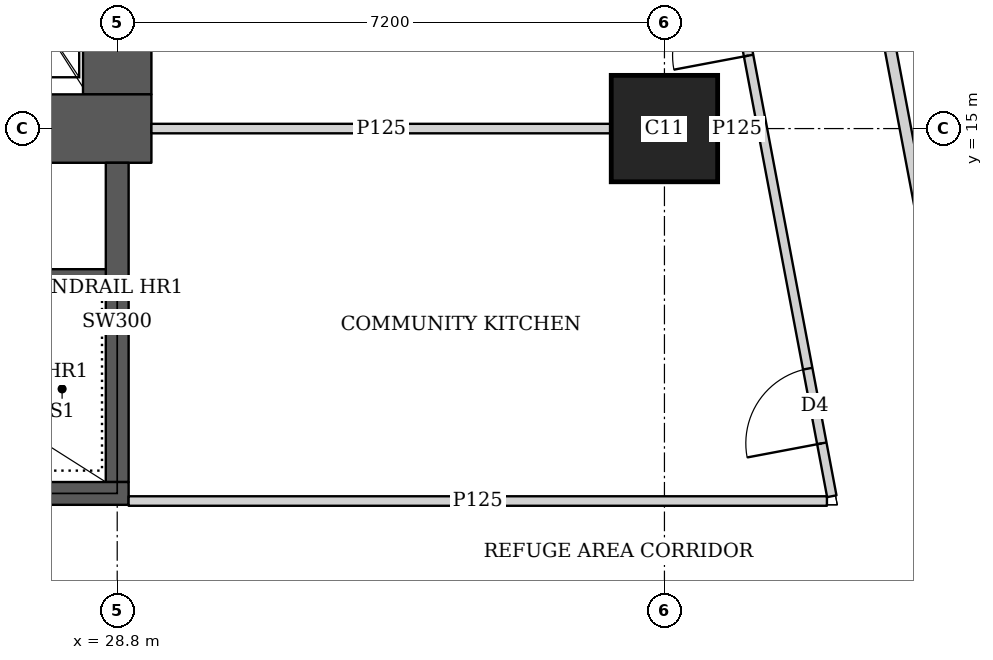
"""IFC4 building model, lengths in metres.
Left out: names, types, materials, properties, quantities, classifications, styles, units other than length and angle.
Written with IfcOpenShell. Run it as: python <this file> out.ifc"""

import sys

from ifc_helpers import new_model, si_unit, direction, frame, frame_2d, origin, origin_2d, place, context, subcontext, project, spatial, rectangle, extrude, element, fill, save


model = new_model("IFC4")
c1 = context("Model", 3, precision=1e-05, world=origin(), true_north=direction((0.0, 1.0)))
c2 = subcontext(c1, "Body", "Model", "MODEL_VIEW")
j1 = project(units=[si_unit("LENGTHUNIT", "METRE"), si_unit("PLANEANGLEUNIT", "RADIAN")], contexts=[c1])
p1 = place(None, origin())
s1 = spatial("IfcSite", under=j1, at=p1, CompositionType="ELEMENT")
p2 = place(p1, origin())
s2 = spatial("IfcBuilding", under=s1, at=p2, CompositionType="ELEMENT")
p3 = place(p2, frame((0.0, 0.0, 246.2)))
s3 = spatial("IfcBuildingStorey", under=s2, at=p3, CompositionType="ELEMENT", Elevation=246.2)
p4 = place(p3, frame((36.0, 15.0, 0.0), z_axis=(0.0, 0.0, 1.0), x_axis=(1.0, 0.0, 0.0)))
e1 = element("IfcColumn", 1, at=p4, inside=s3, PredefinedType="COLUMN", context=c2, shape_type="SweptSolid", body=[
    extrude(rectangle(XDim=1.4, YDim=1.4, at=origin_2d()), origin(), (0.0, 0.0, 1.0), 5.4),
])
p5 = place(p3, frame((13.95, 15.0, 0.0), z_axis=(0.0, 0.0, 1.0), x_axis=(1.0, 0.0, 0.0)))
e2 = element("IfcWall", 2, at=p5, inside=s3, PredefinedType="SHEAR", context=c2, shape_type="SweptSolid", body=[
    extrude(rectangle(XDim=15.3, YDim=0.9, at=frame_2d((7.65, 0.0))), origin(), (0.0, 0.0, 1.0), 5.4),
])
p6 = place(p5, frame((4.45, 0.0, 0.0)))
e3 = element("IfcOpeningElement", 3, at=p6, cuts=e2, PredefinedType="OPENING", context=c2, shape_type="SweptSolid", body=[
    extrude(rectangle(XDim=1.8, YDim=2.1, at=frame_2d((0.9, 1.05))), frame((0.0, 0.46, 0.0), z_axis=(0.0, -1.0, 0.0), x_axis=(1.0, 0.0, 0.0)), (0.0, 0.0, 1.0), 0.92),
])
p7 = place(p5, frame((10.7, 0.0, 0.0)))
e4 = element("IfcOpeningElement", 4, at=p7, cuts=e2, PredefinedType="OPENING", context=c2, shape_type="SweptSolid", body=[
    extrude(rectangle(XDim=1.1, YDim=2.1, at=frame_2d((0.55, 1.05))), frame((0.0, 0.46, 0.0), z_axis=(0.0, -1.0, 0.0), x_axis=(1.0, 0.0, 0.0)), (0.0, 0.0, 1.0), 0.92),
])
p8 = place(p3, frame((28.8, 15.45, 0.0), z_axis=(0.0, 0.0, 1.0), x_axis=(0.0, 1.0, 0.0)))
e5 = element("IfcWall", 5, at=p8, inside=s3, PredefinedType="SHEAR", context=c2, shape_type="SweptSolid", body=[
    extrude(rectangle(XDim=14.1, YDim=0.9, at=frame_2d((7.05, 0.0))), origin(), (0.0, 0.0, 1.0), 5.4),
])
p9 = place(p3, frame((21.45, 10.2, 0.0), z_axis=(0.0, 0.0, 1.0), x_axis=(1.0, 0.0, 0.0)))
e6 = element("IfcWall", 6, at=p9, inside=s3, PredefinedType="SHEAR", context=c2, shape_type="SweptSolid", body=[
    extrude(rectangle(XDim=7.5, YDim=0.3, at=frame_2d((3.75, 0.0))), origin(), (0.0, 0.0, 1.0), 5.4),
])
p10 = place(p9, frame((0.5, 0.0, 0.0)))
e7 = element("IfcOpeningElement", 7, at=p10, cuts=e6, PredefinedType="OPENING", context=c2, shape_type="SweptSolid", body=[
    extrude(rectangle(XDim=1.1, YDim=2.1, at=frame_2d((0.55, 1.05))), frame((0.0, 0.16, 0.0), z_axis=(0.0, -1.0, 0.0), x_axis=(1.0, 0.0, 0.0)), (0.0, 0.0, 1.0), 0.32),
])
p11 = place(p3, frame((28.8, 10.35, 0.0), z_axis=(0.0, 0.0, 1.0), x_axis=(0.0, 1.0, 0.0)))
e8 = element("IfcWall", 8, at=p11, inside=s3, PredefinedType="SHEAR", context=c2, shape_type="SweptSolid", body=[
    extrude(rectangle(XDim=4.2, YDim=0.3, at=frame_2d((2.1, 0.0))), origin(), (0.0, 0.0, 1.0), 5.4),
])
p12 = place(p3, frame((33.382, 45.65, 0.0), z_axis=(0.0, 0.0, 1.0), x_axis=(0.185582712124, -0.982628646519, 0.0)))
e9 = element("IfcWall", 9, at=p12, inside=s3, PredefinedType="SOLIDWALL", context=c2, shape_type="SweptSolid", body=[
    extrude(rectangle(XDim=46.044, YDim=0.15, at=frame_2d((23.022, 0.0))), origin(), (0.0, 0.0, 1.0), 3.35),
])
p13 = place(p12, frame((24.35, 0.0, 0.0)))
e10 = element("IfcOpeningElement", 10, at=p13, cuts=e9, PredefinedType="OPENING", context=c2, shape_type="SweptSolid", body=[
    extrude(rectangle(XDim=1.0, YDim=2.1, at=frame_2d((0.5, 1.05))), frame((0.0, 0.085, 0.0), z_axis=(0.0, -1.0, 0.0), x_axis=(1.0, 0.0, 0.0)), (0.0, 0.0, 1.0), 0.17),
])
p14 = place(p3, frame((28.95, 10.1, 0.0), z_axis=(0.0, 0.0, 1.0), x_axis=(1.0, 0.0, 0.0)))
e11 = element("IfcWall", 11, at=p14, inside=s3, PredefinedType="PARTITIONING", context=c2, shape_type="SweptSolid", body=[
    extrude(rectangle(XDim=9.188, YDim=0.125, at=frame_2d((4.594, 0.0))), origin(), (0.0, 0.0, 1.0), 2.75),
])
p15 = place(p3, frame((38.202, 10.163, 0.0), z_axis=(0.0, 0.0, 1.0), x_axis=(-0.185610321132, 0.982623431783, 0.0)))
e12 = element("IfcWall", 12, at=p15, inside=s3, PredefinedType="PARTITIONING", context=c2, shape_type="SweptSolid", body=[
    extrude(rectangle(XDim=25.111, YDim=0.125, at=frame_2d((12.556, 0.0))), origin(), (0.0, 0.0, 1.0), 3.55),
])
p16 = place(p15, frame((0.708, 0.0, 0.0)))
e13 = element("IfcOpeningElement", 13, at=p16, cuts=e12, PredefinedType="OPENING", context=c2, shape_type="SweptSolid", body=[
    extrude(rectangle(XDim=1.0, YDim=2.1, at=frame_2d((0.5, 1.05))), frame((0.0, 0.073, 0.0), z_axis=(0.0, -1.0, 0.0), x_axis=(1.0, 0.0, 0.0)), (0.0, 0.0, 1.0), 0.145),
])
p17 = place(p15, frame((5.9, 0.0, 0.0)))
e14 = element("IfcOpeningElement", 14, at=p17, cuts=e12, PredefinedType="OPENING", context=c2, shape_type="SweptSolid", body=[
    extrude(rectangle(XDim=1.0, YDim=2.1, at=frame_2d((0.5, 1.05))), frame((0.0, 0.073, 0.0), z_axis=(0.0, -1.0, 0.0), x_axis=(1.0, 0.0, 0.0)), (0.0, 0.0, 1.0), 0.145),
])
p18 = place(p15, frame((21.15, 0.0, 0.0)))
e15 = element("IfcOpeningElement", 15, at=p18, cuts=e12, PredefinedType="OPENING", context=c2, shape_type="SweptSolid", body=[
    extrude(rectangle(XDim=1.0, YDim=2.1, at=frame_2d((0.5, 1.05))), frame((0.0, 0.073, 0.0), z_axis=(0.0, -1.0, 0.0), x_axis=(1.0, 0.0, 0.0)), (0.0, 0.0, 1.0), 0.145),
])
p19 = place(p15, frame((13.378, 0.0, 0.0)))
e16 = element("IfcOpeningElement", 16, at=p19, cuts=e12, PredefinedType="OPENING", context=c2, shape_type="SweptSolid", body=[
    extrude(rectangle(XDim=1.0, YDim=2.1, at=frame_2d((0.5, 1.05))), frame((0.0, 0.073, 0.0), z_axis=(0.0, -1.0, 0.0), x_axis=(1.0, 0.0, 0.0)), (0.0, 0.0, 1.0), 0.145),
])
p20 = place(p15, frame((15.973, 0.0, 0.0)))
e17 = element("IfcOpeningElement", 17, at=p20, cuts=e12, PredefinedType="OPENING", context=c2, shape_type="SweptSolid", body=[
    extrude(rectangle(XDim=1.0, YDim=2.1, at=frame_2d((0.5, 1.05))), frame((0.0, 0.073, 0.0), z_axis=(0.0, -1.0, 0.0), x_axis=(1.0, 0.0, 0.0)), (0.0, 0.0, 1.0), 0.145),
])
p21 = place(p15, frame((18.467, 0.0, 0.0)))
e18 = element("IfcOpeningElement", 18, at=p21, cuts=e12, PredefinedType="OPENING", context=c2, shape_type="SweptSolid", body=[
    extrude(rectangle(XDim=1.0, YDim=2.1, at=frame_2d((0.5, 1.05))), frame((0.0, 0.073, 0.0), z_axis=(0.0, -1.0, 0.0), x_axis=(1.0, 0.0, 0.0)), (0.0, 0.0, 1.0), 0.145),
])
p22 = place(p3, frame((29.25, 15.0, 0.0), z_axis=(0.0, 0.0, 1.0), x_axis=(1.0, 0.0, 0.0)))
e19 = element("IfcWall", 19, at=p22, inside=s3, PredefinedType="PARTITIONING", context=c2, shape_type="SweptSolid", body=[
    extrude(rectangle(XDim=6.049, YDim=0.125, at=frame_2d((3.024, 0.0))), origin(), (0.0, 0.0, 1.0), 3.55),
])
p23 = place(p3, frame((36.701, 15.0, 0.0), z_axis=(0.0, 0.0, 1.0), x_axis=(1.0, 0.0, 0.0)))
e20 = element("IfcWall", 20, at=p23, inside=s3, PredefinedType="PARTITIONING", context=c2, shape_type="SweptSolid", body=[
    extrude(rectangle(XDim=0.512, YDim=0.125, at=frame_2d((0.256, 0.0))), origin(), (0.0, 0.0, 1.0), 3.55),
])
p24 = place(p3, frame((23.0, 13.05, 0.0), z_axis=(0.0, 0.0, 1.0), x_axis=(1.0, 0.0, 0.0)))
e21 = element("IfcWall", 21, at=p24, inside=s3, PredefinedType="SHEAR", context=c2, shape_type="SweptSolid", body=[
    extrude(rectangle(XDim=5.8, YDim=0.2, at=frame_2d((2.9, 0.0))), origin(), (0.0, 0.0, 1.0), 5.4),
])
p25 = place(p16, origin())
e22 = element("IfcDoor", 22, at=p25, inside=s3, OperationType="SINGLE_SWING_LEFT", PredefinedType="DOOR", context=c2, shape_type="SweptSolid", body=[
    extrude(rectangle(XDim=1.0, YDim=2.1, at=frame_2d((0.5, 1.05))), frame((0.0, 0.025, 0.0), z_axis=(0.0, -1.0, 0.0), x_axis=(1.0, 0.0, 0.0)), (0.0, 0.0, 1.0), 0.05),
])
fill(e13, e22)
p26 = place(p17, origin())
e23 = element("IfcDoor", 23, at=p26, inside=s3, OperationType="SINGLE_SWING_LEFT", PredefinedType="DOOR", context=c2, shape_type="SweptSolid", body=[
    extrude(rectangle(XDim=1.0, YDim=2.1, at=frame_2d((0.5, 1.05))), frame((0.0, 0.025, 0.0), z_axis=(0.0, -1.0, 0.0), x_axis=(1.0, 0.0, 0.0)), (0.0, 0.0, 1.0), 0.05),
])
fill(e14, e23)
save(model, sys.argv[1])
